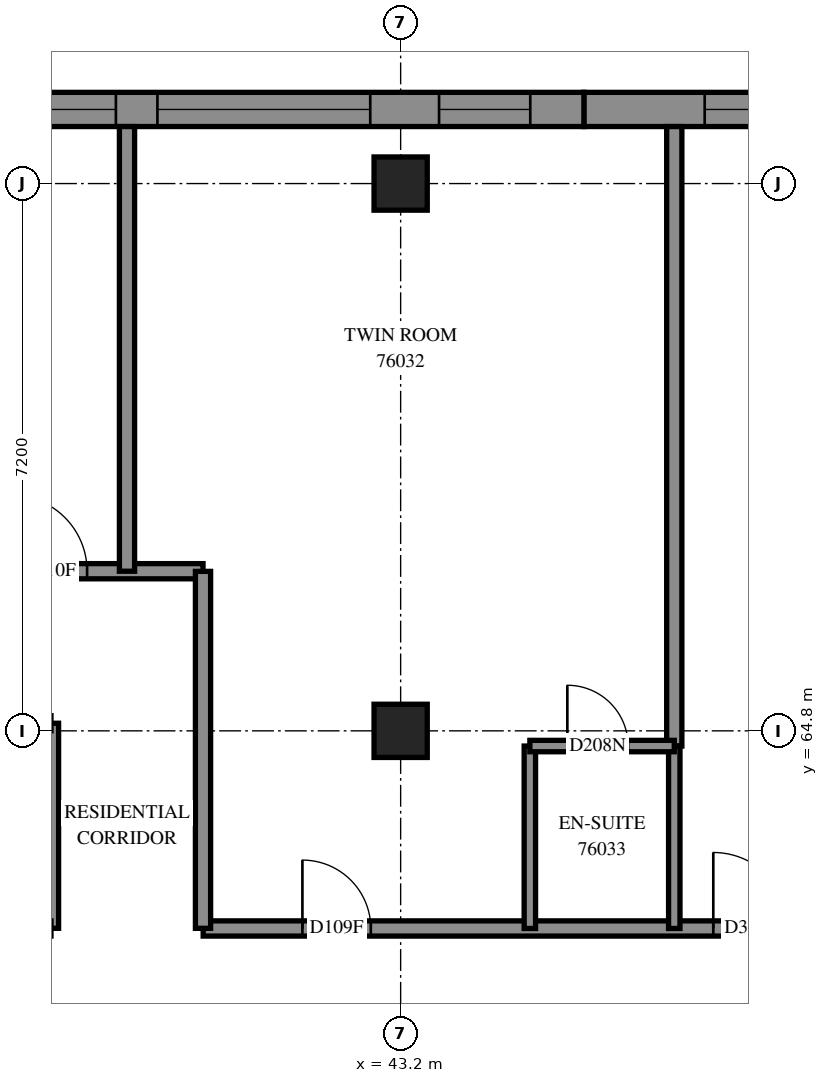
"""IFC4 building model, lengths in metres.
Left out: names, types, materials, properties, quantities, classifications, styles, units other than length and angle.
Written with IfcOpenShell. Run it as: python <this file> out.ifc"""

import sys

from ifc_helpers import new_model, si_unit, direction, frame, frame_2d, origin, origin_2d, place, context, subcontext, project, spatial, polyline, rectangle, outline, extrude, element, fill, save


model = new_model("IFC4")
c1 = context("Model", 3, precision=1e-05, world=origin(), true_north=direction((0.0, 1.0)))
c2 = subcontext(c1, "Body", "Model", "MODEL_VIEW")
j1 = project(units=[si_unit("LENGTHUNIT", "METRE"), si_unit("PLANEANGLEUNIT", "RADIAN")], contexts=[c1])
p1 = place(None, origin())
s1 = spatial("IfcSite", under=j1, at=p1, CompositionType="ELEMENT")
p2 = place(p1, origin())
s2 = spatial("IfcBuilding", under=s1, at=p2, CompositionType="ELEMENT")
p3 = place(p2, frame((0.0, 0.0, 277.8)))
s3 = spatial("IfcBuildingStorey", under=s2, at=p3, CompositionType="ELEMENT", Elevation=277.8)
for number, where, z_axis, x_axis in (
    (1, (43.2, 64.8, 0.0), (0.0, 0.0, 1.0), (1.0, 0.0, 0.0)),
    (2, (43.2, 72.0, 0.0), (0.0, 0.0, 1.0), (1.0, 0.0, 0.0)),
):
    element("IfcColumn", number, at=place(p3, frame(where, z_axis=z_axis, x_axis=x_axis)), inside=s3, PredefinedType="COLUMN", context=c2, shape_type="SweptSolid", body=[
        extrude(rectangle(XDim=0.7, YDim=0.7, at=origin_2d()), origin(), (0.0, 0.0, 1.0), 3.1),
    ])
p4 = place(p3, frame((53.314, 72.975, 0.0), z_axis=(0.0, 0.0, 1.0), x_axis=(-1.0, 0.0, 0.0)))
e3 = element("IfcWall", 3, at=p4, inside=s3, PredefinedType="SOLIDWALL", context=c2, shape_type="SweptSolid", body=[
    extrude(outline(polyline([(0.018, -0.225), (7.703, -0.225), (7.703, 0.225), (-0.018, 0.225), (0.018, -0.225)])), origin(), (0.0, 0.0, 1.0), 3.1),
])
p5 = place(p4, frame((3.314, 0.0, 0.45)))
e4 = element("IfcOpeningElement", 4, at=p5, cuts=e3, PredefinedType="OPENING", context=c2, shape_type="SweptSolid", body=[
    extrude(rectangle(XDim=2.8, YDim=2.55, at=frame_2d((1.4, 1.275))), frame((0.0, 0.235, 0.0), z_axis=(0.0, -1.0, 0.0), x_axis=(1.0, 0.0, 0.0)), (0.0, 0.0, 1.0), 0.47),
])
p6 = place(p4, frame((0.957, 0.0, 0.45)))
e5 = element("IfcOpeningElement", 5, at=p6, cuts=e3, PredefinedType="OPENING", context=c2, shape_type="SweptSolid", body=[
    extrude(rectangle(XDim=1.2, YDim=2.55, at=frame_2d((0.6, 1.275))), frame((0.0, 0.235, 0.0), z_axis=(0.0, -1.0, 0.0), x_axis=(1.0, 0.0, 0.0)), (0.0, 0.0, 1.0), 0.47),
])
p7 = place(p3, frame((45.611, 72.975, 0.0), z_axis=(0.0, 0.0, 1.0), x_axis=(-1.0, 0.0, 0.0)))
e6 = element("IfcWall", 6, at=p7, inside=s3, PredefinedType="SOLIDWALL", context=c2, shape_type="SweptSolid", body=[
    extrude(outline(polyline([(0.0, -0.225), (7.686, -0.225), (7.721, 0.225), (0.0, 0.225), (0.0, -0.225)])), origin(), (0.0, 0.0, 1.0), 3.1),
])
p8 = place(p7, frame((2.811, 0.0, 0.45)))
e7 = element("IfcOpeningElement", 7, at=p8, cuts=e6, PredefinedType="OPENING", context=c2, shape_type="SweptSolid", body=[
    extrude(rectangle(XDim=2.8, YDim=2.55, at=frame_2d((1.4, 1.275))), frame((0.0, 0.235, 0.0), z_axis=(0.0, -1.0, 0.0), x_axis=(1.0, 0.0, 0.0)), (0.0, 0.0, 1.0), 0.47),
])
p9 = place(p7, frame((0.705, 0.0, 0.45)))
e8 = element("IfcOpeningElement", 8, at=p9, cuts=e6, PredefinedType="OPENING", context=c2, shape_type="SweptSolid", body=[
    extrude(rectangle(XDim=1.2, YDim=2.55, at=frame_2d((0.6, 1.275))), frame((0.0, 0.235, 0.0), z_axis=(0.0, -1.0, 0.0), x_axis=(1.0, 0.0, 0.0)), (0.0, 0.0, 1.0), 0.47),
])
p10 = place(p7, frame((6.157, 0.0, 0.45)))
e9 = element("IfcOpeningElement", 9, at=p10, cuts=e6, PredefinedType="OPENING", context=c2, shape_type="SweptSolid", body=[
    extrude(rectangle(XDim=1.2, YDim=2.55, at=frame_2d((0.6, 1.275))), frame((0.0, 0.235, 0.0), z_axis=(0.0, -1.0, 0.0), x_axis=(1.0, 0.0, 0.0)), (0.0, 0.0, 1.0), 0.47),
])
p11 = place(p3, frame((28.8, 66.9, 0.0), z_axis=(0.0, 0.0, 1.0), x_axis=(1.0, 0.0, 0.0)))
e10 = element("IfcWall", 10, at=p11, inside=s3, PredefinedType="PARTITIONING", context=c2, shape_type="SweptSolid", body=[
    extrude(rectangle(XDim=11.8, YDim=0.2, at=frame_2d((5.9, 0.0))), origin(), (0.0, 0.0, 1.0), 3.1),
])
p12 = place(p11, frame((2.075, 0.0, 0.0)))
e11 = element("IfcOpeningElement", 11, at=p12, cuts=e10, PredefinedType="OPENING", context=c2, shape_type="SweptSolid", body=[
    extrude(rectangle(XDim=1.0, YDim=2.1, at=frame_2d((0.5, 1.05))), frame((0.0, 0.11, 0.0), z_axis=(0.0, -1.0, 0.0), x_axis=(1.0, 0.0, 0.0)), (0.0, 0.0, 1.0), 0.22),
])
p13 = place(p11, frame((9.275, 0.0, 0.0)))
e12 = element("IfcOpeningElement", 12, at=p13, cuts=e10, PredefinedType="OPENING", context=c2, shape_type="SweptSolid", body=[
    extrude(rectangle(XDim=1.0, YDim=2.1, at=frame_2d((0.5, 1.05))), frame((0.0, 0.11, 0.0), z_axis=(0.0, -1.0, 0.0), x_axis=(1.0, 0.0, 0.0)), (0.0, 0.0, 1.0), 0.22),
])
p14 = place(p11, frame((4.125, 0.0, 0.0)))
e13 = element("IfcOpeningElement", 13, at=p14, cuts=e10, PredefinedType="OPENING", context=c2, shape_type="SweptSolid", body=[
    extrude(rectangle(XDim=1.0, YDim=2.1, at=frame_2d((0.5, 1.05))), frame((0.0, 0.11, 0.0), z_axis=(0.0, -1.0, 0.0), x_axis=(1.0, 0.0, 0.0)), (0.0, 0.0, 1.0), 0.22),
])
p15 = place(p3, frame((40.602, 62.2, 0.0), z_axis=(0.0, 0.0, 1.0), x_axis=(1.0, 0.0, 0.0)))
e14 = element("IfcWall", 14, at=p15, inside=s3, PredefinedType="PARTITIONING", context=c2, shape_type="SweptSolid", body=[
    extrude(rectangle(XDim=9.798, YDim=0.2, at=frame_2d((4.899, 0.0))), origin(), (0.0, 0.0, 1.0), 3.1),
])
p16 = place(p15, frame((1.306, 0.0, 0.0)))
e15 = element("IfcOpeningElement", 15, at=p16, cuts=e14, PredefinedType="OPENING", context=c2, shape_type="SweptSolid", body=[
    extrude(rectangle(XDim=0.9, YDim=2.1, at=frame_2d((0.45, 1.05))), frame((0.0, 0.11, 0.0), z_axis=(0.0, -1.0, 0.0), x_axis=(1.0, 0.0, 0.0)), (0.0, 0.0, 1.0), 0.22),
])
p17 = place(p15, frame((6.711, 0.0, 0.0)))
e16 = element("IfcOpeningElement", 16, at=p17, cuts=e14, PredefinedType="OPENING", context=c2, shape_type="SweptSolid", body=[
    extrude(rectangle(XDim=1.0, YDim=2.1, at=frame_2d((0.5, 1.05))), frame((0.0, 0.11, 0.0), z_axis=(0.0, -1.0, 0.0), x_axis=(1.0, 0.0, 0.0)), (0.0, 0.0, 1.0), 0.22),
])
p18 = place(p3, frame((46.8, 64.6, 0.0), z_axis=(0.0, 0.0, 1.0), x_axis=(0.0, 1.0, 0.0)))
e17 = element("IfcWall", 17, at=p18, inside=s3, PredefinedType="PARTITIONING", context=c2, shape_type="SweptSolid", body=[
    extrude(rectangle(XDim=8.15, YDim=0.2, at=frame_2d((4.075, 0.0))), origin(), (0.0, 0.0, 1.0), 3.1),
])
p19 = place(p3, frame((39.6, 66.9, 0.0), z_axis=(0.0, 0.0, 1.0), x_axis=(0.0, 1.0, 0.0)))
e18 = element("IfcWall", 18, at=p19, inside=s3, PredefinedType="PARTITIONING", context=c2, shape_type="SweptSolid", body=[
    extrude(rectangle(XDim=5.85, YDim=0.2, at=frame_2d((2.925, 0.0))), origin(), (0.0, 0.0, 1.0), 3.1),
])
p20 = place(p3, frame((40.6, 62.202, 0.0), z_axis=(0.0, 0.0, 1.0), x_axis=(0.0, 1.0, 0.0)))
e19 = element("IfcWall", 19, at=p20, inside=s3, PredefinedType="PARTITIONING", context=c2, shape_type="SweptSolid", body=[
    extrude(rectangle(XDim=4.696, YDim=0.2, at=frame_2d((2.348, 0.0))), origin(), (0.0, 0.0, 1.0), 3.1),
])
p21 = place(p3, frame((38.6, 62.202, 0.0), z_axis=(0.0, 0.0, 1.0), x_axis=(0.0, 1.0, 0.0)))
e20 = element("IfcWall", 20, at=p21, inside=s3, PredefinedType="PARTITIONING", context=c2, shape_type="SweptSolid", body=[
    extrude(rectangle(XDim=2.698, YDim=0.2, at=frame_2d((1.349, 0.0))), origin(), (0.0, 0.0, 1.0), 3.1),
])
for number, where, z_axis, x_axis in (
    (21, (44.9, 62.2, 0.0), (0.0, 0.0, 1.0), (0.0, 1.0, 0.0)),
    (22, (46.8, 62.2, 0.0), (0.0, 0.0, 1.0), (0.0, 1.0, 0.0)),
):
    element("IfcWall", number, at=place(p3, frame(where, z_axis=z_axis, x_axis=x_axis)), inside=s3, PredefinedType="PARTITIONING", context=c2, shape_type="SweptSolid", body=[
        extrude(rectangle(XDim=2.4, YDim=0.15, at=frame_2d((1.2, 0.0))), origin(), (0.0, 0.0, 1.0), 3.1),
    ])
p22 = place(p3, frame((44.9, 64.6, 0.0), z_axis=(0.0, 0.0, 1.0), x_axis=(1.0, 0.0, 0.0)))
e23 = element("IfcWall", 23, at=p22, inside=s3, PredefinedType="PARTITIONING", context=c2, shape_type="SweptSolid", body=[
    extrude(rectangle(XDim=1.9, YDim=0.15, at=frame_2d((0.95, 0.0))), origin(), (0.0, 0.0, 1.0), 3.1),
])
p23 = place(p22, frame((0.493, 0.0, 0.0)))
e24 = element("IfcOpeningElement", 24, at=p23, cuts=e23, PredefinedType="OPENING", context=c2, shape_type="SweptSolid", body=[
    extrude(rectangle(XDim=0.8, YDim=2.1, at=frame_2d((0.4, 1.05))), frame((0.0, 0.085, 0.0), z_axis=(0.0, -1.0, 0.0), x_axis=(1.0, 0.0, 0.0)), (0.0, 0.0, 1.0), 0.17),
])
p24 = place(p5, origin())
e25 = element("IfcWindow", 25, at=p24, inside=s3, PartitioningType="SINGLE_PANEL", PredefinedType="WINDOW", context=c2, shape_type="SweptSolid", body=[
    extrude(rectangle(XDim=2.8, YDim=2.55, at=frame_2d((1.4, 1.275))), frame((0.0, 0.205, 0.0), z_axis=(0.0, -1.0, 0.0), x_axis=(1.0, 0.0, 0.0)), (0.0, 0.0, 1.0), 0.06),
])
fill(e4, e25)
p25 = place(p8, origin())
e26 = element("IfcWindow", 26, at=p25, inside=s3, PartitioningType="SINGLE_PANEL", PredefinedType="WINDOW", context=c2, shape_type="SweptSolid", body=[
    extrude(rectangle(XDim=2.8, YDim=2.55, at=frame_2d((1.4, 1.275))), frame((0.0, 0.205, 0.0), z_axis=(0.0, -1.0, 0.0), x_axis=(1.0, 0.0, 0.0)), (0.0, 0.0, 1.0), 0.06),
])
fill(e7, e26)
p26 = place(p9, origin())
e27 = element("IfcWindow", 27, at=p26, inside=s3, PartitioningType="SINGLE_PANEL", PredefinedType="WINDOW", context=c2, shape_type="SweptSolid", body=[
    extrude(rectangle(XDim=1.2, YDim=2.55, at=frame_2d((0.6, 1.275))), frame((0.0, 0.205, 0.0), z_axis=(0.0, -1.0, 0.0), x_axis=(1.0, 0.0, 0.0)), (0.0, 0.0, 1.0), 0.06),
])
fill(e8, e27)
p27 = place(p10, origin())
e28 = element("IfcWindow", 28, at=p27, inside=s3, PartitioningType="SINGLE_PANEL", PredefinedType="WINDOW", context=c2, shape_type="SweptSolid", body=[
    extrude(rectangle(XDim=1.2, YDim=2.55, at=frame_2d((0.6, 1.275))), frame((0.0, 0.205, 0.0), z_axis=(0.0, -1.0, 0.0), x_axis=(1.0, 0.0, 0.0)), (0.0, 0.0, 1.0), 0.06),
])
fill(e9, e28)
p28 = place(p13, origin())
e29 = element("IfcDoor", 29, at=p28, inside=s3, OperationType="SINGLE_SWING_RIGHT", PredefinedType="DOOR", context=c2, shape_type="SweptSolid", body=[
    extrude(rectangle(XDim=1.0, YDim=2.1, at=frame_2d((0.5, 1.05))), frame((0.0, 0.025, 0.0), z_axis=(0.0, -1.0, 0.0), x_axis=(1.0, 0.0, 0.0)), (0.0, 0.0, 1.0), 0.05),
])
fill(e12, e29)
p29 = place(p16, origin())
e30 = element("IfcDoor", 30, at=p29, inside=s3, OperationType="SINGLE_SWING_LEFT", PredefinedType="DOOR", context=c2, shape_type="SweptSolid", body=[
    extrude(rectangle(XDim=0.9, YDim=2.1, at=frame_2d((0.45, 1.05))), frame((0.0, 0.025, 0.0), z_axis=(0.0, -1.0, 0.0), x_axis=(1.0, 0.0, 0.0)), (0.0, 0.0, 1.0), 0.05),
])
fill(e15, e30)
p30 = place(p23, origin())
e31 = element("IfcDoor", 31, at=p30, inside=s3, OperationType="SINGLE_SWING_RIGHT", PredefinedType="DOOR", context=c2, shape_type="SweptSolid", body=[
    extrude(rectangle(XDim=0.8, YDim=2.1, at=frame_2d((0.4, 1.05))), frame((0.0, 0.025, 0.0), z_axis=(0.0, -1.0, 0.0), x_axis=(1.0, 0.0, 0.0)), (0.0, 0.0, 1.0), 0.05),
])
fill(e24, e31)
p31 = place(p17, origin())
e32 = element("IfcDoor", 32, at=p31, inside=s3, OperationType="SINGLE_SWING_LEFT", PredefinedType="DOOR", context=c2, shape_type="SweptSolid", body=[
    extrude(rectangle(XDim=1.0, YDim=2.1, at=frame_2d((0.5, 1.05))), frame((0.0, 0.025, 0.0), z_axis=(0.0, -1.0, 0.0), x_axis=(1.0, 0.0, 0.0)), (0.0, 0.0, 1.0), 0.05),
])
fill(e16, e32)
save(model, sys.argv[1])
